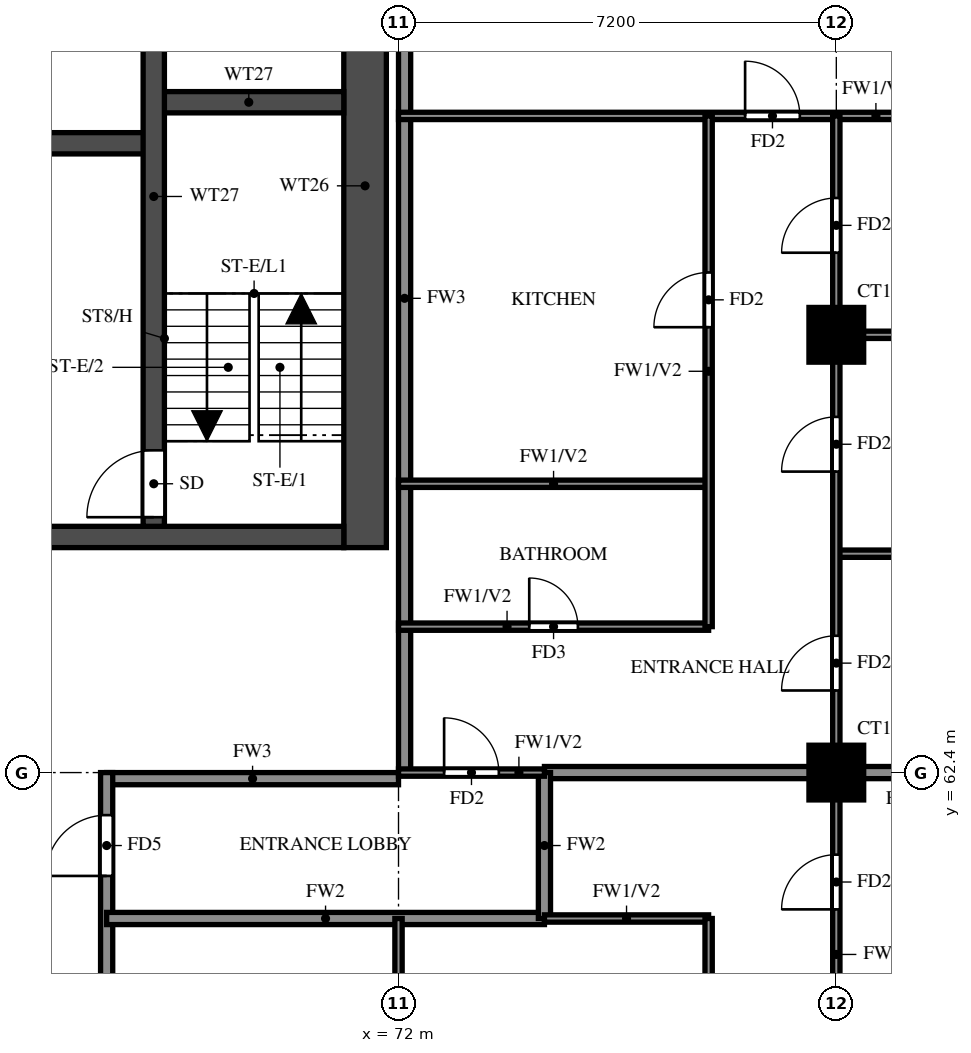
"""IFC4 building model, lengths in metres.
Left out: names, types, materials, properties, quantities, classifications, styles, units other than length and angle.
Written with IfcOpenShell. Run it as: python <this file> out.ifc"""

import sys

from ifc_helpers import new_model, si_unit, direction, frame, frame_2d, origin, origin_2d, place, context, subcontext, project, spatial, rectangle, extrude, source, transform, mapped, element, fill, save


model = new_model("IFC4")
c1 = context("Model", 3, precision=1e-05, world=origin(), true_north=direction((0.0, 1.0)))
c2 = subcontext(c1, "Body", "Model", "MODEL_VIEW")
j1 = project(units=[si_unit("LENGTHUNIT", "METRE"), si_unit("PLANEANGLEUNIT", "RADIAN")], contexts=[c1])
p1 = place(None, origin())
s1 = spatial("IfcSite", under=j1, at=p1, CompositionType="ELEMENT")
p2 = place(p1, origin())
s2 = spatial("IfcBuilding", under=s1, at=p2, CompositionType="ELEMENT")
p3 = place(p2, frame((0.0, 0.0, 185.0)))
s3 = spatial("IfcBuildingStorey", under=s2, at=p3, CompositionType="ELEMENT", Elevation=185.0)
m1 = source(origin(), c2, "Body", "SweptSolid", [
    extrude(rectangle(XDim=0.9, YDim=0.9, at=origin_2d()), origin(), (0.0, 0.0, 1.0), 3.2),
])
for number, where, z_axis, x_axis in (
    (1, (79.2, 62.4, 0.0), (0.0, 0.0, 1.0), (1.0, 0.0, 0.0)),
    (2, (79.2, 69.6, 0.0), (0.0, 0.0, 1.0), (1.0, 0.0, 0.0)),
):
    element("IfcColumn", number, at=place(p3, frame(where, z_axis=z_axis, x_axis=x_axis)), inside=s3, PredefinedType="COLUMN", context=c2, shape_type="MappedRepresentation", body=[
        mapped(m1, transform((0.0, 0.0, 0.0))),
    ])
p4 = place(p3, frame((71.45, 66.1, 0.0), z_axis=(0.0, 0.0, 1.0), x_axis=(0.0, 1.0, 0.0)))
e3 = element("IfcWall", 3, at=p4, inside=s3, PredefinedType="SHEAR", context=c2, shape_type="SweptSolid", body=[
    extrude(rectangle(XDim=11.9, YDim=0.7, at=frame_2d((5.95, 0.0))), origin(), (0.0, 0.0, 1.0), 3.2),
])
p5 = place(p3, frame((29.7, 66.275, 0.0), z_axis=(0.0, 0.0, 1.0), x_axis=(1.0, 0.0, 0.0)))
e4 = element("IfcWall", 4, at=p5, inside=s3, PredefinedType="SHEAR", context=c2, shape_type="SweptSolid", body=[
    extrude(rectangle(XDim=41.4, YDim=0.35, at=frame_2d((20.7, 0.0))), origin(), (0.0, 0.0, 1.0), 3.2),
])
p6 = place(p5, frame((0.925, 0.0, 0.0)))
e5 = element("IfcOpeningElement", 5, at=p6, cuts=e4, PredefinedType="OPENING", context=c2, shape_type="SweptSolid", body=[
    extrude(rectangle(XDim=1.1, YDim=2.1, at=frame_2d((0.55, 1.05))), frame((0.0, 0.185, 0.0), z_axis=(0.0, -1.0, 0.0), x_axis=(1.0, 0.0, 0.0)), (0.0, 0.0, 1.0), 0.37),
])
p7 = place(p5, frame((3.712, 0.0, 0.0)))
e6 = element("IfcOpeningElement", 6, at=p7, cuts=e4, PredefinedType="OPENING", context=c2, shape_type="SweptSolid", body=[
    extrude(rectangle(XDim=1.8, YDim=2.1, at=frame_2d((0.9, 1.05))), frame((0.0, 0.185, 0.0), z_axis=(0.0, -1.0, 0.0), x_axis=(1.0, 0.0, 0.0)), (0.0, 0.0, 1.0), 0.37),
])
p8 = place(p3, frame((32.825, 72.75, 0.0), z_axis=(0.0, 0.0, 1.0), x_axis=(1.0, 0.0, 0.0)))
e7 = element("IfcWall", 7, at=p8, inside=s3, PredefinedType="SHEAR", context=c2, shape_type="SweptSolid", body=[
    extrude(rectangle(XDim=35.15, YDim=0.35, at=frame_2d((17.575, 0.0))), origin(), (0.0, 0.0, 1.0), 3.2),
])
p9 = place(p8, frame((19.8, 0.0, 0.0)))
e8 = element("IfcOpeningElement", 8, at=p9, cuts=e7, PredefinedType="OPENING", context=c2, shape_type="SweptSolid", body=[
    extrude(rectangle(XDim=1.1, YDim=2.1, at=frame_2d((0.55, 1.05))), frame((0.0, 0.185, 0.0), z_axis=(0.0, -1.0, 0.0), x_axis=(1.0, 0.0, 0.0)), (0.0, 0.0, 1.0), 0.37),
])
p10 = place(p8, frame((27.7, 0.0, 0.0)))
e9 = element("IfcOpeningElement", 9, at=p10, cuts=e7, PredefinedType="OPENING", context=c2, shape_type="SweptSolid", body=[
    extrude(rectangle(XDim=1.1, YDim=2.1, at=frame_2d((0.55, 1.05))), frame((0.0, 0.185, 0.0), z_axis=(0.0, -1.0, 0.0), x_axis=(1.0, 0.0, 0.0)), (0.0, 0.0, 1.0), 0.37),
])
p11 = place(p8, frame((30.3, 0.0, 0.0)))
e10 = element("IfcOpeningElement", 10, at=p11, cuts=e7, PredefinedType="OPENING", context=c2, shape_type="SweptSolid", body=[
    extrude(rectangle(XDim=1.1, YDim=2.1, at=frame_2d((0.55, 1.05))), frame((0.0, 0.185, 0.0), z_axis=(0.0, -1.0, 0.0), x_axis=(1.0, 0.0, 0.0)), (0.0, 0.0, 1.0), 0.37),
])
p12 = place(p8, frame((3.8, 0.0, 0.0)))
e11 = element("IfcOpeningElement", 11, at=p12, cuts=e7, PredefinedType="OPENING", context=c2, shape_type="SweptSolid", body=[
    extrude(rectangle(XDim=1.1, YDim=2.1, at=frame_2d((0.55, 1.05))), frame((0.0, 0.185, 0.0), z_axis=(0.0, -1.0, 0.0), x_axis=(1.0, 0.0, 0.0)), (0.0, 0.0, 1.0), 0.37),
])
p13 = place(p8, frame((6.55, 0.0, 0.0)))
e12 = element("IfcOpeningElement", 12, at=p13, cuts=e7, PredefinedType="OPENING", context=c2, shape_type="SweptSolid", body=[
    extrude(rectangle(XDim=1.1, YDim=2.1, at=frame_2d((0.55, 1.05))), frame((0.0, 0.185, 0.0), z_axis=(0.0, -1.0, 0.0), x_axis=(1.0, 0.0, 0.0)), (0.0, 0.0, 1.0), 0.37),
])
p14 = place(p8, frame((9.3, 0.0, 0.0)))
e13 = element("IfcOpeningElement", 13, at=p14, cuts=e7, PredefinedType="OPENING", context=c2, shape_type="SweptSolid", body=[
    extrude(rectangle(XDim=1.1, YDim=2.1, at=frame_2d((0.55, 1.05))), frame((0.0, 0.185, 0.0), z_axis=(0.0, -1.0, 0.0), x_axis=(1.0, 0.0, 0.0)), (0.0, 0.0, 1.0), 0.37),
])
p15 = place(p8, frame((12.05, 0.0, 0.0)))
e14 = element("IfcOpeningElement", 14, at=p15, cuts=e7, PredefinedType="OPENING", context=c2, shape_type="SweptSolid", body=[
    extrude(rectangle(XDim=1.1, YDim=2.1, at=frame_2d((0.55, 1.05))), frame((0.0, 0.185, 0.0), z_axis=(0.0, -1.0, 0.0), x_axis=(1.0, 0.0, 0.0)), (0.0, 0.0, 1.0), 0.37),
])
p16 = place(p8, frame((14.8, 0.0, 0.0)))
e15 = element("IfcOpeningElement", 15, at=p16, cuts=e7, PredefinedType="OPENING", context=c2, shape_type="SweptSolid", body=[
    extrude(rectangle(XDim=1.1, YDim=2.1, at=frame_2d((0.55, 1.05))), frame((0.0, 0.185, 0.0), z_axis=(0.0, -1.0, 0.0), x_axis=(1.0, 0.0, 0.0)), (0.0, 0.0, 1.0), 0.37),
])
p17 = place(p8, frame((17.55, 0.0, 0.0)))
e16 = element("IfcOpeningElement", 16, at=p17, cuts=e7, PredefinedType="OPENING", context=c2, shape_type="SweptSolid", body=[
    extrude(rectangle(XDim=1.1, YDim=2.1, at=frame_2d((0.55, 1.05))), frame((0.0, 0.185, 0.0), z_axis=(0.0, -1.0, 0.0), x_axis=(1.0, 0.0, 0.0)), (0.0, 0.0, 1.0), 0.37),
])
p18 = place(p8, frame((0.938, 0.0, 0.0)))
e17 = element("IfcOpeningElement", 17, at=p18, cuts=e7, PredefinedType="OPENING", context=c2, shape_type="SweptSolid", body=[
    extrude(rectangle(XDim=1.1, YDim=2.1, at=frame_2d((0.55, 1.05))), frame((0.0, 0.185, 0.0), z_axis=(0.0, -1.0, 0.0), x_axis=(1.0, 0.0, 0.0)), (0.0, 0.0, 1.0), 0.37),
])
p19 = place(p3, frame((67.975, 73.425, 0.0), z_axis=(0.0, 0.0, 1.0), x_axis=(1.0, 0.0, 0.0)))
e18 = element("IfcWall", 18, at=p19, inside=s3, PredefinedType="SHEAR", context=c2, shape_type="SweptSolid", body=[
    extrude(rectangle(XDim=3.125, YDim=0.35, at=frame_2d((1.562, 0.0))), origin(), (0.0, 0.0, 1.0), 3.2),
])
p20 = place(p3, frame((67.975, 66.45, 0.0), z_axis=(0.0, 0.0, 1.0), x_axis=(0.0, 1.0, 0.0)))
e19 = element("IfcWall", 19, at=p20, inside=s3, PredefinedType="SHEAR", context=c2, shape_type="SweptSolid", body=[
    extrude(rectangle(XDim=10.85, YDim=0.35, at=frame_2d((5.425, 0.0))), origin(), (0.0, 0.0, 1.0), 3.2),
])
p21 = place(p20, frame((0.15, 0.0, 0.0)))
e20 = element("IfcOpeningElement", 20, at=p21, cuts=e19, PredefinedType="OPENING", context=c2, shape_type="SweptSolid", body=[
    extrude(rectangle(XDim=1.1, YDim=2.1, at=frame_2d((0.55, 1.05))), frame((0.0, 0.185, 0.0), z_axis=(0.0, -1.0, 0.0), x_axis=(1.0, 0.0, 0.0)), (0.0, 0.0, 1.0), 0.37),
])
p22 = place(p3, frame((67.2, 62.3, 0.0), z_axis=(0.0, 0.0, 1.0), x_axis=(1.0, 0.0, 0.0)))
e21 = element("IfcWall", 21, at=p22, inside=s3, PredefinedType="SOLIDWALL", context=c2, shape_type="SweptSolid", body=[
    extrude(rectangle(XDim=4.8, YDim=0.2, at=frame_2d((2.4, 0.0))), origin(), (0.0, 0.0, 1.0), 3.2),
])
p23 = place(p3, frame((67.2, 45.6, 0.0), z_axis=(0.0, 0.0, 1.0), x_axis=(0.0, 1.0, 0.0)))
e22 = element("IfcWall", 22, at=p23, inside=s3, PredefinedType="SOLIDWALL", context=c2, shape_type="SweptSolid", body=[
    extrude(rectangle(XDim=16.8, YDim=0.2, at=frame_2d((8.4, 0.0))), origin(), (0.0, 0.0, 1.0), 3.2),
])
p24 = place(p23, frame((8.3, 0.0, 0.0)))
e23 = element("IfcOpeningElement", 23, at=p24, cuts=e22, PredefinedType="OPENING", context=c2, shape_type="SweptSolid", body=[
    extrude(rectangle(XDim=1.0, YDim=2.1, at=frame_2d((0.5, 1.05))), frame((0.0, 0.11, 0.0), z_axis=(0.0, -1.0, 0.0), x_axis=(1.0, 0.0, 0.0)), (0.0, 0.0, 1.0), 0.22),
])
p25 = place(p23, frame((15.1, 0.0, 0.0)))
e24 = element("IfcOpeningElement", 24, at=p25, cuts=e22, PredefinedType="OPENING", context=c2, shape_type="SweptSolid", body=[
    extrude(rectangle(XDim=1.0, YDim=2.1, at=frame_2d((0.5, 1.05))), frame((0.0, 0.11, 0.0), z_axis=(0.0, -1.0, 0.0), x_axis=(1.0, 0.0, 0.0)), (0.0, 0.0, 1.0), 0.22),
])
p26 = place(p23, frame((0.7, 0.0, 0.0)))
e25 = element("IfcOpeningElement", 25, at=p26, cuts=e22, PredefinedType="OPENING", context=c2, shape_type="SweptSolid", body=[
    extrude(rectangle(XDim=1.0, YDim=2.1, at=frame_2d((0.5, 1.05))), frame((0.0, 0.11, 0.0), z_axis=(0.0, -1.0, 0.0), x_axis=(1.0, 0.0, 0.0)), (0.0, 0.0, 1.0), 0.22),
])
p27 = place(p3, frame((72.1, 62.4, 0.0), z_axis=(0.0, 0.0, 1.0), x_axis=(0.0, 1.0, 0.0)))
e26 = element("IfcWall", 26, at=p27, inside=s3, PredefinedType="SOLIDWALL", context=c2, shape_type="SweptSolid", body=[
    extrude(rectangle(XDim=15.6, YDim=0.2, at=frame_2d((7.8, 0.0))), origin(), (0.0, 0.0, 1.0), 3.2),
])
p28 = place(p3, frame((67.2, 60.0, 0.0), z_axis=(0.0, 0.0, 1.0), x_axis=(1.0, 0.0, 0.0)))
e27 = element("IfcWall", 27, at=p28, inside=s3, PredefinedType="SOLIDWALL", context=c2, shape_type="SweptSolid", body=[
    extrude(rectangle(XDim=7.2, YDim=0.2, at=frame_2d((3.6, 0.0))), origin(), (0.0, 0.0, 1.0), 3.2),
])
p29 = place(p3, frame((74.4, 62.4, 0.0), z_axis=(0.0, 0.0, 1.0), x_axis=(1.0, 0.0, 0.0)))
e28 = element("IfcWall", 28, at=p29, inside=s3, PredefinedType="SOLIDWALL", context=c2, shape_type="SweptSolid", body=[
    extrude(rectangle(XDim=11.875, YDim=0.2, at=frame_2d((5.938, 0.0))), origin(), (0.0, 0.0, 1.0), 3.2),
])
p30 = place(p3, frame((74.4, 60.0, 0.0), z_axis=(0.0, 0.0, 1.0), x_axis=(0.0, 1.0, 0.0)))
e29 = element("IfcWall", 29, at=p30, inside=s3, PredefinedType="SOLIDWALL", context=c2, shape_type="SweptSolid", body=[
    extrude(rectangle(XDim=2.4, YDim=0.2, at=frame_2d((1.2, 0.0))), origin(), (0.0, 0.0, 1.0), 3.2),
])
p31 = place(p3, frame((74.4, 60.0, 0.0), z_axis=(0.0, 0.0, 1.0), x_axis=(1.0, 0.0, 0.0)))
e30 = element("IfcWall", 30, at=p31, inside=s3, PredefinedType="PARTITIONING", context=c2, shape_type="SweptSolid", body=[
    extrude(rectangle(XDim=2.7, YDim=0.12, at=frame_2d((1.35, 0.0))), origin(), (0.0, 0.0, 1.0), 3.2),
])
p32 = place(p3, frame((72.0, 62.4, 0.0), z_axis=(0.0, 0.0, 1.0), x_axis=(1.0, 0.0, 0.0)))
e31 = element("IfcWall", 31, at=p32, inside=s3, PredefinedType="PARTITIONING", context=c2, shape_type="SweptSolid", body=[
    extrude(rectangle(XDim=2.4, YDim=0.12, at=frame_2d((1.2, 0.0))), origin(), (0.0, 0.0, 1.0), 3.2),
])
p33 = place(p32, frame((0.75, 0.0, 0.0)))
e32 = element("IfcOpeningElement", 32, at=p33, cuts=e31, PredefinedType="OPENING", context=c2, shape_type="SweptSolid", body=[
    extrude(rectangle(XDim=0.9, YDim=2.1, at=frame_2d((0.45, 1.05))), frame((0.0, 0.07, 0.0), z_axis=(0.0, -1.0, 0.0), x_axis=(1.0, 0.0, 0.0)), (0.0, 0.0, 1.0), 0.14),
])
p34 = place(p3, frame((72.0, 64.8, 0.0), z_axis=(0.0, 0.0, 1.0), x_axis=(1.0, 0.0, 0.0)))
e33 = element("IfcWall", 33, at=p34, inside=s3, PredefinedType="PARTITIONING", context=c2, shape_type="SweptSolid", body=[
    extrude(rectangle(XDim=5.1, YDim=0.12, at=frame_2d((2.55, 0.0))), origin(), (0.0, 0.0, 1.0), 3.2),
])
p35 = place(p34, frame((2.15, 0.0, 0.0)))
e34 = element("IfcOpeningElement", 34, at=p35, cuts=e33, PredefinedType="OPENING", context=c2, shape_type="SweptSolid", body=[
    extrude(rectangle(XDim=0.8, YDim=2.1, at=frame_2d((0.4, 1.05))), frame((0.0, 0.07, 0.0), z_axis=(0.0, -1.0, 0.0), x_axis=(1.0, 0.0, 0.0)), (0.0, 0.0, 1.0), 0.14),
])
p36 = place(p3, frame((79.2, 66.0, 0.0), z_axis=(0.0, 0.0, 1.0), x_axis=(1.0, 0.0, 0.0)))
e35 = element("IfcWall", 35, at=p36, inside=s3, PredefinedType="PARTITIONING", context=c2, shape_type="SweptSolid", body=[
    extrude(rectangle(XDim=7.075, YDim=0.12, at=frame_2d((3.538, 0.0))), origin(), (0.0, 0.0, 1.0), 2.3),
])
p37 = place(p3, frame((72.0, 67.15, 0.0), z_axis=(0.0, 0.0, 1.0), x_axis=(1.0, 0.0, 0.0)))
e36 = element("IfcWall", 36, at=p37, inside=s3, PredefinedType="PARTITIONING", context=c2, shape_type="SweptSolid", body=[
    extrude(rectangle(XDim=5.1, YDim=0.12, at=frame_2d((2.55, 0.0))), origin(), (0.0, 0.0, 1.0), 3.2),
])
p38 = place(p3, frame((79.2, 69.6, 0.0), z_axis=(0.0, 0.0, 1.0), x_axis=(1.0, 0.0, 0.0)))
e37 = element("IfcWall", 37, at=p38, inside=s3, PredefinedType="PARTITIONING", context=c2, shape_type="SweptSolid", body=[
    extrude(rectangle(XDim=7.075, YDim=0.12, at=frame_2d((3.538, 0.0))), origin(), (0.0, 0.0, 1.0), 3.2),
])
p39 = place(p3, frame((72.0, 73.2, 0.0), z_axis=(0.0, 0.0, 1.0), x_axis=(1.0, 0.0, 0.0)))
e38 = element("IfcWall", 38, at=p39, inside=s3, PredefinedType="PARTITIONING", context=c2, shape_type="SweptSolid", body=[
    extrude(rectangle(XDim=14.275, YDim=0.12, at=frame_2d((7.137, 0.0))), origin(), (0.0, 0.0, 1.0), 2.3),
])
p40 = place(p39, frame((5.7, 0.0, 0.0)))
e39 = element("IfcOpeningElement", 39, at=p40, cuts=e38, PredefinedType="OPENING", context=c2, shape_type="SweptSolid", body=[
    extrude(rectangle(XDim=0.9, YDim=2.1, at=frame_2d((0.45, 1.05))), frame((0.0, 0.07, 0.0), z_axis=(0.0, -1.0, 0.0), x_axis=(1.0, 0.0, 0.0)), (0.0, 0.0, 1.0), 0.14),
])
for number, where, z_axis, x_axis in (
    (40, (72.0, 55.6, 0.0), (0.0, 0.0, 1.0), (0.0, 1.0, 0.0)),
    (41, (77.1, 55.6, 0.0), (0.0, 0.0, 1.0), (0.0, 1.0, 0.0)),
):
    element("IfcWall", number, at=place(p3, frame(where, z_axis=z_axis, x_axis=x_axis)), inside=s3, PredefinedType="PARTITIONING", context=c2, shape_type="SweptSolid", body=[
        extrude(rectangle(XDim=4.4, YDim=0.12, at=frame_2d((2.2, 0.0))), origin(), (0.0, 0.0, 1.0), 3.2),
    ])
p41 = place(p3, frame((77.1, 64.8, 0.0), z_axis=(0.0, 0.0, 1.0), x_axis=(0.0, 1.0, 0.0)))
e42 = element("IfcWall", 42, at=p41, inside=s3, PredefinedType="PARTITIONING", context=c2, shape_type="SweptSolid", body=[
    extrude(rectangle(XDim=8.4, YDim=0.12, at=frame_2d((4.2, 0.0))), origin(), (0.0, 0.0, 1.0), 3.2),
])
p42 = place(p41, frame((4.925, 0.0, 0.0)))
e43 = element("IfcOpeningElement", 43, at=p42, cuts=e42, PredefinedType="OPENING", context=c2, shape_type="SweptSolid", body=[
    extrude(rectangle(XDim=0.9, YDim=2.1, at=frame_2d((0.45, 1.05))), frame((0.0, 0.07, 0.0), z_axis=(0.0, -1.0, 0.0), x_axis=(1.0, 0.0, 0.0)), (0.0, 0.0, 1.0), 0.14),
])
p43 = place(p3, frame((79.2, 48.125, 0.0), z_axis=(0.0, 0.0, 1.0), x_axis=(0.0, 1.0, 0.0)))
e44 = element("IfcWall", 44, at=p43, inside=s3, PredefinedType="PARTITIONING", context=c2, shape_type="SweptSolid", body=[
    extrude(rectangle(XDim=25.075, YDim=0.12, at=frame_2d((12.538, 0.0))), origin(), (0.0, 0.0, 1.0), 3.2),
])
p44 = place(p43, frame((1.288, 0.0, 0.0)))
e45 = element("IfcOpeningElement", 45, at=p44, cuts=e44, PredefinedType="OPENING", context=c2, shape_type="SweptSolid", body=[
    extrude(rectangle(XDim=0.9, YDim=2.1, at=frame_2d((0.45, 1.05))), frame((0.0, 0.07, 0.0), z_axis=(0.0, -1.0, 0.0), x_axis=(1.0, 0.0, 0.0)), (0.0, 0.0, 1.0), 0.14),
])
p45 = place(p43, frame((7.825, 0.0, 0.0)))
e46 = element("IfcOpeningElement", 46, at=p45, cuts=e44, PredefinedType="OPENING", context=c2, shape_type="SweptSolid", body=[
    extrude(rectangle(XDim=1.5, YDim=2.1, at=frame_2d((0.75, 1.05))), frame((0.0, 0.07, 0.0), z_axis=(0.0, -1.0, 0.0), x_axis=(1.0, 0.0, 0.0)), (0.0, 0.0, 1.0), 0.14),
])
p46 = place(p43, frame((12.025, 0.0, 0.0)))
e47 = element("IfcOpeningElement", 47, at=p46, cuts=e44, PredefinedType="OPENING", context=c2, shape_type="SweptSolid", body=[
    extrude(rectangle(XDim=0.9, YDim=2.1, at=frame_2d((0.45, 1.05))), frame((0.0, 0.07, 0.0), z_axis=(0.0, -1.0, 0.0), x_axis=(1.0, 0.0, 0.0)), (0.0, 0.0, 1.0), 0.14),
])
p47 = place(p43, frame((15.625, 0.0, 0.0)))
e48 = element("IfcOpeningElement", 48, at=p47, cuts=e44, PredefinedType="OPENING", context=c2, shape_type="SweptSolid", body=[
    extrude(rectangle(XDim=0.9, YDim=2.1, at=frame_2d((0.45, 1.05))), frame((0.0, 0.07, 0.0), z_axis=(0.0, -1.0, 0.0), x_axis=(1.0, 0.0, 0.0)), (0.0, 0.0, 1.0), 0.14),
])
p48 = place(p43, frame((19.225, 0.0, 0.0)))
e49 = element("IfcOpeningElement", 49, at=p48, cuts=e44, PredefinedType="OPENING", context=c2, shape_type="SweptSolid", body=[
    extrude(rectangle(XDim=0.9, YDim=2.1, at=frame_2d((0.45, 1.05))), frame((0.0, 0.07, 0.0), z_axis=(0.0, -1.0, 0.0), x_axis=(1.0, 0.0, 0.0)), (0.0, 0.0, 1.0), 0.14),
])
p49 = place(p43, frame((22.825, 0.0, 0.0)))
e50 = element("IfcOpeningElement", 50, at=p49, cuts=e44, PredefinedType="OPENING", context=c2, shape_type="SweptSolid", body=[
    extrude(rectangle(XDim=0.9, YDim=2.1, at=frame_2d((0.45, 1.05))), frame((0.0, 0.07, 0.0), z_axis=(0.0, -1.0, 0.0), x_axis=(1.0, 0.0, 0.0)), (0.0, 0.0, 1.0), 0.14),
])
p50 = place(p21, origin())
e51 = element("IfcDoor", 51, at=p50, inside=s3, OperationType="SINGLE_SWING_LEFT", PredefinedType="DOOR", context=c2, shape_type="SweptSolid", body=[
    extrude(rectangle(XDim=1.1, YDim=2.1, at=frame_2d((0.55, 1.05))), frame((0.0, 0.025, 0.0), z_axis=(0.0, -1.0, 0.0), x_axis=(1.0, 0.0, 0.0)), (0.0, 0.0, 1.0), 0.05),
])
fill(e20, e51)
p51 = place(p46, origin())
e52 = element("IfcDoor", 52, at=p51, inside=s3, OperationType="SINGLE_SWING_RIGHT", PredefinedType="DOOR", context=c2, shape_type="SweptSolid", body=[
    extrude(rectangle(XDim=0.9, YDim=2.1, at=frame_2d((0.45, 1.05))), frame((0.0, 0.025, 0.0), z_axis=(0.0, -1.0, 0.0), x_axis=(1.0, 0.0, 0.0)), (0.0, 0.0, 1.0), 0.05),
])
fill(e47, e52)
p52 = place(p33, origin())
e53 = element("IfcDoor", 53, at=p52, inside=s3, OperationType="SINGLE_SWING_LEFT", PredefinedType="DOOR", context=c2, shape_type="SweptSolid", body=[
    extrude(rectangle(XDim=0.9, YDim=2.1, at=frame_2d((0.45, 1.05))), frame((0.0, 0.025, 0.0), z_axis=(0.0, -1.0, 0.0), x_axis=(1.0, 0.0, 0.0)), (0.0, 0.0, 1.0), 0.05),
])
fill(e32, e53)
p53 = place(p25, origin())
e54 = element("IfcDoor", 54, at=p53, inside=s3, OperationType="SINGLE_SWING_LEFT", PredefinedType="DOOR", context=c2, shape_type="SweptSolid", body=[
    extrude(rectangle(XDim=1.0, YDim=2.1, at=frame_2d((0.5, 1.05))), frame((0.0, 0.025, 0.0), z_axis=(0.0, -1.0, 0.0), x_axis=(1.0, 0.0, 0.0)), (0.0, 0.0, 1.0), 0.05),
])
fill(e24, e54)
p54 = place(p47, origin())
e55 = element("IfcDoor", 55, at=p54, inside=s3, OperationType="SINGLE_SWING_RIGHT", PredefinedType="DOOR", context=c2, shape_type="SweptSolid", body=[
    extrude(rectangle(XDim=0.9, YDim=2.1, at=frame_2d((0.45, 1.05))), frame((0.0, 0.025, 0.0), z_axis=(0.0, -1.0, 0.0), x_axis=(1.0, 0.0, 0.0)), (0.0, 0.0, 1.0), 0.05),
])
fill(e48, e55)
p55 = place(p48, origin())
e56 = element("IfcDoor", 56, at=p55, inside=s3, OperationType="SINGLE_SWING_LEFT", PredefinedType="DOOR", context=c2, shape_type="SweptSolid", body=[
    extrude(rectangle(XDim=0.9, YDim=2.1, at=frame_2d((0.45, 1.05))), frame((0.0, 0.025, 0.0), z_axis=(0.0, -1.0, 0.0), x_axis=(1.0, 0.0, 0.0)), (0.0, 0.0, 1.0), 0.05),
])
fill(e49, e56)
p56 = place(p49, origin())
e57 = element("IfcDoor", 57, at=p56, inside=s3, OperationType="SINGLE_SWING_LEFT", PredefinedType="DOOR", context=c2, shape_type="SweptSolid", body=[
    extrude(rectangle(XDim=0.9, YDim=2.1, at=frame_2d((0.45, 1.05))), frame((0.0, 0.025, 0.0), z_axis=(0.0, -1.0, 0.0), x_axis=(1.0, 0.0, 0.0)), (0.0, 0.0, 1.0), 0.05),
])
fill(e50, e57)
p57 = place(p40, origin())
e58 = element("IfcDoor", 58, at=p57, inside=s3, OperationType="SINGLE_SWING_RIGHT", PredefinedType="DOOR", context=c2, shape_type="SweptSolid", body=[
    extrude(rectangle(XDim=0.9, YDim=2.1, at=frame_2d((0.45, 1.05))), frame((0.0, 0.025, 0.0), z_axis=(0.0, -1.0, 0.0), x_axis=(1.0, 0.0, 0.0)), (0.0, 0.0, 1.0), 0.05),
])
fill(e39, e58)
p58 = place(p35, origin())
e59 = element("IfcDoor", 59, at=p58, inside=s3, OperationType="SINGLE_SWING_LEFT", PredefinedType="DOOR", context=c2, shape_type="SweptSolid", body=[
    extrude(rectangle(XDim=0.8, YDim=2.1, at=frame_2d((0.4, 1.05))), frame((0.0, 0.025, 0.0), z_axis=(0.0, -1.0, 0.0), x_axis=(1.0, 0.0, 0.0)), (0.0, 0.0, 1.0), 0.05),
])
fill(e34, e59)
p59 = place(p42, origin())
e60 = element("IfcDoor", 60, at=p59, inside=s3, OperationType="SINGLE_SWING_LEFT", PredefinedType="DOOR", context=c2, shape_type="SweptSolid", body=[
    extrude(rectangle(XDim=0.9, YDim=2.1, at=frame_2d((0.45, 1.05))), frame((0.0, 0.025, 0.0), z_axis=(0.0, -1.0, 0.0), x_axis=(1.0, 0.0, 0.0)), (0.0, 0.0, 1.0), 0.05),
])
fill(e43, e60)
save(model, sys.argv[1])
